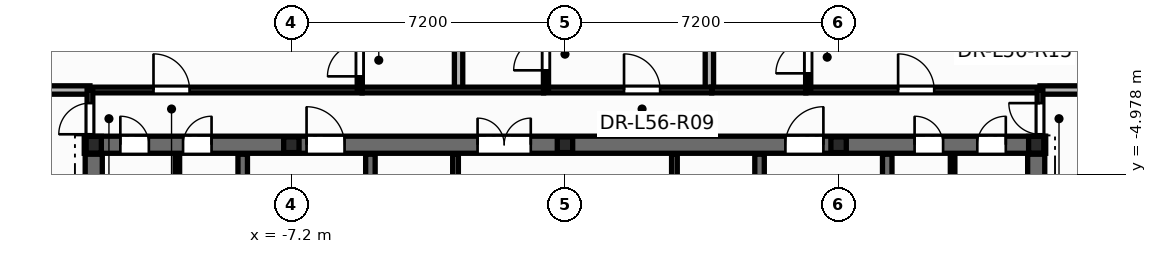
"""IFC4 building model, lengths in metres.
Left out: names, types, materials, properties, quantities, classifications, styles, units other than length and angle.
Written with IfcOpenShell. Run it as: python <this file> out.ifc"""

import sys

from ifc_helpers import new_model, si_unit, direction, frame, frame_2d, origin, origin_2d, place, context, subcontext, project, spatial, rectangle, i_section, extrude, element, fill, save


model = new_model("IFC4")
c1 = context("Model", 3, precision=1e-05, world=origin(), true_north=direction((0.0, 1.0)))
c2 = subcontext(c1, "Body", "Model", "MODEL_VIEW")
j1 = project(units=[si_unit("LENGTHUNIT", "METRE"), si_unit("PLANEANGLEUNIT", "RADIAN")], contexts=[c1])
p1 = place(None, origin())
s1 = spatial("IfcSite", under=j1, at=p1, CompositionType="ELEMENT")
p2 = place(p1, origin())
s2 = spatial("IfcBuilding", under=s1, at=p2, CompositionType="ELEMENT")
p3 = place(p2, frame((0.0, 0.0, 214.5)))
s3 = spatial("IfcBuildingStorey", under=s2, at=p3, CompositionType="ELEMENT", Elevation=214.5)
for number, where, z_axis, x_axis in (
    (1, (12.4, -4.2, 0.0), (0.0, 0.0, 1.0), (1.0, 0.0, 0.0)),
    (2, (-12.4, -4.2, 0.0), (0.0, 0.0, 1.0), (1.0, 0.0, 0.0)),
):
    element("IfcColumn", number, at=place(p3, frame(where, z_axis=z_axis, x_axis=x_axis)), inside=s3, PredefinedType="COLUMN", context=c2, shape_type="SweptSolid", body=[
        extrude(i_section(OverallWidth=0.4, OverallDepth=0.44, WebThickness=0.028, FlangeThickness=0.04, at=origin_2d()), origin(), (0.0, 0.0, 1.0), 3.6),
    ])
for number, where, z_axis, x_axis in (
    (3, (-7.2, -4.2, 0.0), (0.0, 0.0, 1.0), (1.0, 0.0, 0.0)),
    (4, (0.0, -4.2, 0.0), (0.0, 0.0, 1.0), (1.0, 0.0, 0.0)),
    (5, (7.2, -4.2, 0.0), (0.0, 0.0, 1.0), (1.0, 0.0, 0.0)),
):
    element("IfcColumn", number, at=place(p3, frame(where, z_axis=z_axis, x_axis=x_axis)), inside=s3, PredefinedType="PILASTER", context=c2, shape_type="SweptSolid", body=[
        extrude(i_section(OverallWidth=0.405, OverallDepth=0.414, WebThickness=0.022, FlangeThickness=0.032, at=origin_2d()), origin(), (0.0, 0.0, 1.0), 3.6),
    ])
p4 = place(p3, frame((-2.88, -7.1, 0.0), z_axis=(0.0, 0.0, 1.0), x_axis=(0.0, 1.0, 0.0)))
e6 = element("IfcWall", 6, at=p4, inside=s3, PredefinedType="PARTITIONING", context=c2, shape_type="SweptSolid", body=[
    extrude(rectangle(XDim=2.65, YDim=0.15, at=frame_2d((1.325, 0.0))), origin(), (0.0, 0.0, 1.0), 3.345),
])
p5 = place(p4, frame((0.85, 0.0, 0.0)))
e7 = element("IfcOpeningElement", 7, at=p5, cuts=e6, PredefinedType="OPENING", context=c2, shape_type="SweptSolid", body=[
    extrude(rectangle(XDim=0.886, YDim=2.104, at=frame_2d((0.44, 1.052))), frame((0.0, 0.085, 0.0), z_axis=(0.0, -1.0, 0.0), x_axis=(1.0, 0.0, 0.0)), (0.0, 0.0, 1.0), 0.17),
])
p6 = place(p3, frame((2.88, -7.1, 0.0), z_axis=(0.0, 0.0, 1.0), x_axis=(0.0, 1.0, 0.0)))
e8 = element("IfcWall", 8, at=p6, inside=s3, PredefinedType="PARTITIONING", context=c2, shape_type="SweptSolid", body=[
    extrude(rectangle(XDim=2.65, YDim=0.15, at=frame_2d((1.325, 0.0))), origin(), (0.0, 0.0, 1.0), 3.345),
])
p7 = place(p6, frame((0.85, 0.0, 0.0)))
e9 = element("IfcOpeningElement", 9, at=p7, cuts=e8, PredefinedType="OPENING", context=c2, shape_type="SweptSolid", body=[
    extrude(rectangle(XDim=0.886, YDim=2.104, at=frame_2d((0.44, 1.052))), frame((0.0, 0.085, 0.0), z_axis=(0.0, -1.0, 0.0), x_axis=(1.0, 0.0, 0.0)), (0.0, 0.0, 1.0), 0.17),
])
for number, where, z_axis, x_axis in (
    (10, (-10.2, -5.52, 0.0), (0.0, 0.0, 1.0), (0.0, 1.0, 0.0)),
    (11, (10.2, -5.52, 0.0), (0.0, 0.0, 1.0), (0.0, 1.0, 0.0)),
):
    element("IfcWall", number, at=place(p3, frame(where, z_axis=z_axis, x_axis=x_axis)), inside=s3, PredefinedType="PARTITIONING", context=c2, shape_type="SweptSolid", body=[
        extrude(rectangle(XDim=1.12, YDim=0.12, at=frame_2d((0.56, 0.0))), origin(), (0.0, 0.0, 1.0), 3.345),
    ])
p8 = place(p3, frame((-12.65, -4.2, 0.0), z_axis=(0.0, 0.0, 1.0), x_axis=(1.0, 0.0, 0.0)))
e12 = element("IfcWall", 12, at=p8, inside=s3, PredefinedType="SHEAR", context=c2, shape_type="SweptSolid", body=[
    extrude(rectangle(XDim=25.3, YDim=0.45, at=frame_2d((12.65, 0.0))), origin(), (0.0, 0.0, 1.0), 3.6),
])
p9 = place(p8, frame((0.95, 0.0, 0.0)))
e13 = element("IfcOpeningElement", 13, at=p9, cuts=e12, PredefinedType="OPENING", context=c2, shape_type="SweptSolid", body=[
    extrude(rectangle(XDim=0.756, YDim=2.054, at=frame_2d((0.375, 1.027))), frame((0.0, 0.235, 0.0), z_axis=(0.0, -1.0, 0.0), x_axis=(1.0, 0.0, 0.0)), (0.0, 0.0, 1.0), 0.47),
])
p10 = place(p8, frame((2.6, 0.0, 0.0)))
e14 = element("IfcOpeningElement", 14, at=p10, cuts=e12, PredefinedType="OPENING", context=c2, shape_type="SweptSolid", body=[
    extrude(rectangle(XDim=0.756, YDim=2.054, at=frame_2d((0.375, 1.027))), frame((0.0, 0.235, 0.0), z_axis=(0.0, -1.0, 0.0), x_axis=(1.0, 0.0, 0.0)), (0.0, 0.0, 1.0), 0.47),
])
p11 = place(p8, frame((21.85, 0.0, 0.0)))
e15 = element("IfcOpeningElement", 15, at=p11, cuts=e12, PredefinedType="OPENING", context=c2, shape_type="SweptSolid", body=[
    extrude(rectangle(XDim=0.756, YDim=2.054, at=frame_2d((0.375, 1.027))), frame((0.0, 0.235, 0.0), z_axis=(0.0, -1.0, 0.0), x_axis=(1.0, 0.0, 0.0)), (0.0, 0.0, 1.0), 0.47),
])
p12 = place(p8, frame((23.5, 0.0, 0.0)))
e16 = element("IfcOpeningElement", 16, at=p12, cuts=e12, PredefinedType="OPENING", context=c2, shape_type="SweptSolid", body=[
    extrude(rectangle(XDim=0.756, YDim=2.054, at=frame_2d((0.375, 1.027))), frame((0.0, 0.235, 0.0), z_axis=(0.0, -1.0, 0.0), x_axis=(1.0, 0.0, 0.0)), (0.0, 0.0, 1.0), 0.47),
])
p13 = place(p8, frame((5.85, 0.0, 0.0)))
e17 = element("IfcOpeningElement", 17, at=p13, cuts=e12, PredefinedType="OPENING", context=c2, shape_type="SweptSolid", body=[
    extrude(rectangle(XDim=1.006, YDim=2.104, at=frame_2d((0.5, 1.052))), frame((0.0, 0.235, 0.0), z_axis=(0.0, -1.0, 0.0), x_axis=(1.0, 0.0, 0.0)), (0.0, 0.0, 1.0), 0.47),
])
p14 = place(p8, frame((10.35, 0.0, 0.0)))
e18 = element("IfcOpeningElement", 18, at=p14, cuts=e12, PredefinedType="OPENING", context=c2, shape_type="SweptSolid", body=[
    extrude(rectangle(XDim=1.406, YDim=2.154, at=frame_2d((0.7, 1.077))), frame((0.0, 0.235, 0.0), z_axis=(0.0, -1.0, 0.0), x_axis=(1.0, 0.0, 0.0)), (0.0, 0.0, 1.0), 0.47),
])
p15 = place(p8, frame((18.45, 0.0, 0.0)))
e19 = element("IfcOpeningElement", 19, at=p15, cuts=e12, PredefinedType="OPENING", context=c2, shape_type="SweptSolid", body=[
    extrude(rectangle(XDim=1.006, YDim=2.104, at=frame_2d((0.5, 1.052))), frame((0.0, 0.235, 0.0), z_axis=(0.0, -1.0, 0.0), x_axis=(1.0, 0.0, 0.0)), (0.0, 0.0, 1.0), 0.47),
])
p16 = place(p3, frame((-8.48, -13.85, 0.0), z_axis=(0.0, 0.0, 1.0), x_axis=(0.0, 1.0, 0.0)))
e20 = element("IfcWall", 20, at=p16, inside=s3, PredefinedType="SHEAR", context=c2, shape_type="SweptSolid", body=[
    extrude(rectangle(XDim=9.4, YDim=0.25, at=frame_2d((4.7, 0.0))), origin(), (0.0, 0.0, 1.0), 3.6),
])
p17 = place(p16, frame((6.95, 0.0, 0.0)))
e21 = element("IfcOpeningElement", 21, at=p17, cuts=e20, PredefinedType="OPENING", context=c2, shape_type="SweptSolid", body=[
    extrude(rectangle(XDim=1.006, YDim=2.104, at=frame_2d((0.5, 1.052))), frame((0.0, 0.135, 0.0), z_axis=(0.0, -1.0, 0.0), x_axis=(1.0, 0.0, 0.0)), (0.0, 0.0, 1.0), 0.27),
])
p18 = place(p3, frame((8.48, -13.85, 0.0), z_axis=(0.0, 0.0, 1.0), x_axis=(0.0, 1.0, 0.0)))
e22 = element("IfcWall", 22, at=p18, inside=s3, PredefinedType="SHEAR", context=c2, shape_type="SweptSolid", body=[
    extrude(rectangle(XDim=9.4, YDim=0.25, at=frame_2d((4.7, 0.0))), origin(), (0.0, 0.0, 1.0), 3.6),
])
p19 = place(p18, frame((6.95, 0.0, 0.0)))
e23 = element("IfcOpeningElement", 23, at=p19, cuts=e22, PredefinedType="OPENING", context=c2, shape_type="SweptSolid", body=[
    extrude(rectangle(XDim=1.006, YDim=2.104, at=frame_2d((0.5, 1.052))), frame((0.0, 0.135, 0.0), z_axis=(0.0, -1.0, 0.0), x_axis=(1.0, 0.0, 0.0)), (0.0, 0.0, 1.0), 0.27),
])
for number, where, z_axis, x_axis in (
    (24, (-5.12, -13.85, 0.0), (0.0, 0.0, 1.0), (0.0, 1.0, 0.0)),
    (25, (5.12, -13.85, 0.0), (0.0, 0.0, 1.0), (0.0, 1.0, 0.0)),
):
    element("IfcWall", number, at=place(p3, frame(where, z_axis=z_axis, x_axis=x_axis)), inside=s3, PredefinedType="SHEAR", context=c2, shape_type="SweptSolid", body=[
        extrude(rectangle(XDim=9.4, YDim=0.25, at=frame_2d((4.7, 0.0))), origin(), (0.0, 0.0, 1.0), 3.6),
    ])
for number, where, z_axis, x_axis in (
    (26, (-12.4, -13.85, 0.0), (0.0, 0.0, 1.0), (0.0, 1.0, 0.0)),
    (27, (12.4, -13.85, 0.0), (0.0, 0.0, 1.0), (0.0, 1.0, 0.0)),
):
    element("IfcWall", number, at=place(p3, frame(where, z_axis=z_axis, x_axis=x_axis)), inside=s3, PredefinedType="SHEAR", context=c2, shape_type="SweptSolid", body=[
        extrude(rectangle(XDim=9.4, YDim=0.45, at=frame_2d((4.7, 0.0))), origin(), (0.0, 0.0, 1.0), 3.6),
    ])
p20 = place(p3, frame((-12.5, -2.76, 0.0), z_axis=(0.0, 0.0, 1.0), x_axis=(1.0, 0.0, 0.0)))
e28 = element("IfcWall", 28, at=p20, inside=s3, PredefinedType="PARTITIONING", context=c2, shape_type="SweptSolid", body=[
    extrude(rectangle(XDim=7.16, YDim=0.15, at=frame_2d((3.58, 0.0))), origin(), (0.0, 0.0, 1.0), 2.32),
])
p21 = place(p20, frame((1.672, 0.0, 0.0)))
e29 = element("IfcOpeningElement", 29, at=p21, cuts=e28, PredefinedType="OPENING", context=c2, shape_type="SweptSolid", body=[
    extrude(rectangle(XDim=0.956, YDim=2.104, at=frame_2d((0.475, 1.052))), frame((0.0, 0.085, 0.0), z_axis=(0.0, -1.0, 0.0), x_axis=(1.0, 0.0, 0.0)), (0.0, 0.0, 1.0), 0.17),
])
p22 = place(p3, frame((6.34, -2.76, 0.0), z_axis=(0.0, 0.0, 1.0), x_axis=(1.0, 0.0, 0.0)))
e30 = element("IfcWall", 30, at=p22, inside=s3, PredefinedType="PARTITIONING", context=c2, shape_type="SweptSolid", body=[
    extrude(rectangle(XDim=6.16, YDim=0.15, at=frame_2d((3.08, 0.0))), origin(), (0.0, 0.0, 1.0), 2.32),
])
p23 = place(p22, frame((2.426, 0.0, 0.0)))
e31 = element("IfcOpeningElement", 31, at=p23, cuts=e30, PredefinedType="OPENING", context=c2, shape_type="SweptSolid", body=[
    extrude(rectangle(XDim=0.956, YDim=2.104, at=frame_2d((0.475, 1.052))), frame((0.0, 0.085, 0.0), z_axis=(0.0, -1.0, 0.0), x_axis=(1.0, 0.0, 0.0)), (0.0, 0.0, 1.0), 0.17),
])
p24 = place(p3, frame((-2.8, -2.76, 0.0), z_axis=(0.0, 0.0, 1.0), x_axis=(0.0, 1.0, 0.0)))
e32 = element("IfcWall", 32, at=p24, inside=s3, PredefinedType="PARTITIONING", context=c2, shape_type="SweptSolid", body=[
    extrude(rectangle(XDim=16.11, YDim=0.22, at=frame_2d((8.055, 0.0))), origin(), (0.0, 0.0, 1.0), 2.32),
])
p25 = place(p3, frame((3.8, -2.76, 0.0), z_axis=(0.0, 0.0, 1.0), x_axis=(0.0, 1.0, 0.0)))
e33 = element("IfcWall", 33, at=p25, inside=s3, PredefinedType="PARTITIONING", context=c2, shape_type="SweptSolid", body=[
    extrude(rectangle(XDim=15.483, YDim=0.22, at=frame_2d((7.742, 0.0))), origin(), (0.0, 0.0, 1.0), 2.32),
])
p26 = place(p3, frame((-0.56, -2.76, 0.0), z_axis=(0.0, 0.0, 1.0), x_axis=(1.0, 0.0, 0.0)))
e34 = element("IfcWall", 34, at=p26, inside=s3, PredefinedType="PARTITIONING", context=c2, shape_type="SweptSolid", body=[
    extrude(rectangle(XDim=4.42, YDim=0.15, at=frame_2d((2.21, 0.0))), origin(), (0.0, 0.0, 1.0), 2.32),
])
p27 = place(p26, frame((2.114, 0.0, 0.0)))
e35 = element("IfcOpeningElement", 35, at=p27, cuts=e34, PredefinedType="OPENING", context=c2, shape_type="SweptSolid", body=[
    extrude(rectangle(XDim=0.956, YDim=2.104, at=frame_2d((0.475, 1.052))), frame((0.0, 0.085, 0.0), z_axis=(0.0, -1.0, 0.0), x_axis=(1.0, 0.0, 0.0)), (0.0, 0.0, 1.0), 0.17),
])
p28 = place(p3, frame((-5.4, -2.76, 0.0), z_axis=(0.0, 0.0, 1.0), x_axis=(0.0, 1.0, 0.0)))
e36 = element("IfcWall", 36, at=p28, inside=s3, PredefinedType="PARTITIONING", context=c2, shape_type="SweptSolid", body=[
    extrude(rectangle(XDim=2.92, YDim=0.135, at=frame_2d((1.46, 0.0))), origin(), (0.0, 0.0, 1.0), 3.345),
])
p29 = place(p28, frame((0.359, 0.0, 0.0)))
e37 = element("IfcOpeningElement", 37, at=p29, cuts=e36, PredefinedType="OPENING", context=c2, shape_type="SweptSolid", body=[
    extrude(rectangle(XDim=0.856, YDim=2.104, at=frame_2d((0.425, 1.052))), frame((0.0, 0.078, 0.0), z_axis=(0.0, -1.0, 0.0), x_axis=(1.0, 0.0, 0.0)), (0.0, 0.0, 1.0), 0.155),
])
p30 = place(p3, frame((-0.5, -2.76, 0.0), z_axis=(0.0, 0.0, 1.0), x_axis=(0.0, 1.0, 0.0)))
e38 = element("IfcWall", 38, at=p30, inside=s3, PredefinedType="PARTITIONING", context=c2, shape_type="SweptSolid", body=[
    extrude(rectangle(XDim=2.92, YDim=0.135, at=frame_2d((1.46, 0.0))), origin(), (0.0, 0.0, 1.0), 3.345),
])
p31 = place(p30, frame((0.518, 0.0, 0.0)))
e39 = element("IfcOpeningElement", 39, at=p31, cuts=e38, PredefinedType="OPENING", context=c2, shape_type="SweptSolid", body=[
    extrude(rectangle(XDim=0.856, YDim=2.104, at=frame_2d((0.425, 1.052))), frame((0.0, 0.078, 0.0), z_axis=(0.0, -1.0, 0.0), x_axis=(1.0, 0.0, 0.0)), (0.0, 0.0, 1.0), 0.155),
])
p32 = place(p3, frame((6.4, -2.76, 0.0), z_axis=(0.0, 0.0, 1.0), x_axis=(0.0, 1.0, 0.0)))
e40 = element("IfcWall", 40, at=p32, inside=s3, PredefinedType="PARTITIONING", context=c2, shape_type="SweptSolid", body=[
    extrude(rectangle(XDim=2.92, YDim=0.135, at=frame_2d((1.46, 0.0))), origin(), (0.0, 0.0, 1.0), 3.345),
])
p33 = place(p32, frame((0.438, 0.0, 0.0)))
e41 = element("IfcOpeningElement", 41, at=p33, cuts=e40, PredefinedType="OPENING", context=c2, shape_type="SweptSolid", body=[
    extrude(rectangle(XDim=0.856, YDim=2.104, at=frame_2d((0.425, 1.052))), frame((0.0, 0.078, 0.0), z_axis=(0.0, -1.0, 0.0), x_axis=(1.0, 0.0, 0.0)), (0.0, 0.0, 1.0), 0.155),
])
p34 = place(p3, frame((-5.338, -2.76, 0.0), z_axis=(0.0, 0.0, 1.0), x_axis=(1.0, 0.0, 0.0)))
e42 = element("IfcWall", 42, at=p34, inside=s3, PredefinedType="PARTITIONING", context=c2, shape_type="SweptSolid", body=[
    extrude(rectangle(XDim=4.776, YDim=0.15, at=frame_2d((2.388, 0.0))), origin(), (0.0, 0.0, 1.0), 2.964),
])
p35 = place(p3, frame((3.862, -2.76, 0.0), z_axis=(0.0, 0.0, 1.0), x_axis=(1.0, 0.0, 0.0)))
e43 = element("IfcWall", 43, at=p35, inside=s3, PredefinedType="PARTITIONING", context=c2, shape_type="SweptSolid", body=[
    extrude(rectangle(XDim=2.476, YDim=0.15, at=frame_2d((1.238, 0.0))), origin(), (0.0, 0.0, 1.0), 3.345),
])
for number, where, z_axis, x_axis in (
    (44, (-14.926, -2.76, 0.0), (0.0, 0.0, 1.0), (1.0, 0.0, 0.0)),
    (45, (12.5, -2.76, 0.0), (0.0, 0.0, 1.0), (1.0, 0.0, 0.0)),
):
    element("IfcWall", number, at=place(p3, frame(where, z_axis=z_axis, x_axis=x_axis)), inside=s3, PredefinedType="PARTITIONING", context=c2, shape_type="SweptSolid", body=[
        extrude(rectangle(XDim=2.426, YDim=0.22, at=frame_2d((1.213, 0.0))), origin(), (0.0, 0.0, 1.0), 2.32),
    ])
p36 = place(p3, frame((-12.5, -4.24, 0.0), z_axis=(0.0, 0.0, 1.0), x_axis=(0.0, 1.0, 0.0)))
e46 = element("IfcWall", 46, at=p36, inside=s3, PredefinedType="PARTITIONING", context=c2, shape_type="SweptSolid", body=[
    extrude(rectangle(XDim=1.48, YDim=0.15, at=frame_2d((0.74, 0.0))), origin(), (0.0, 0.0, 1.0), 2.32),
])
p37 = place(p36, frame((0.315, 0.0, 0.0)))
e47 = element("IfcOpeningElement", 47, at=p37, cuts=e46, PredefinedType="OPENING", context=c2, shape_type="SweptSolid", body=[
    extrude(rectangle(XDim=0.826, YDim=2.104, at=frame_2d((0.41, 1.052))), frame((0.0, 0.085, 0.0), z_axis=(0.0, -1.0, 0.0), x_axis=(1.0, 0.0, 0.0)), (0.0, 0.0, 1.0), 0.17),
])
p38 = place(p3, frame((12.5, -4.24, 0.0), z_axis=(0.0, 0.0, 1.0), x_axis=(0.0, 1.0, 0.0)))
e48 = element("IfcWall", 48, at=p38, inside=s3, PredefinedType="PARTITIONING", context=c2, shape_type="SweptSolid", body=[
    extrude(rectangle(XDim=1.48, YDim=0.15, at=frame_2d((0.74, 0.0))), origin(), (0.0, 0.0, 1.0), 2.32),
])
p39 = place(p38, frame((0.315, 0.0, 0.0)))
e49 = element("IfcOpeningElement", 49, at=p39, cuts=e48, PredefinedType="OPENING", context=c2, shape_type="SweptSolid", body=[
    extrude(rectangle(XDim=0.826, YDim=2.104, at=frame_2d((0.41, 1.052))), frame((0.0, 0.085, 0.0), z_axis=(0.0, -1.0, 0.0), x_axis=(1.0, 0.0, 0.0)), (0.0, 0.0, 1.0), 0.17),
])
p40 = place(p9, origin())
e50 = element("IfcDoor", 50, at=p40, inside=s3, OperationType="SINGLE_SWING_LEFT", PredefinedType="DOOR", context=c2, shape_type="SweptSolid", body=[
    extrude(rectangle(XDim=0.75, YDim=2.05, at=frame_2d((0.375, 1.025))), frame((0.0, 0.025, 0.0), z_axis=(0.0, -1.0, 0.0), x_axis=(1.0, 0.0, 0.0)), (0.0, 0.0, 1.0), 0.05),
])
fill(e13, e50)
p41 = place(p10, origin())
e51 = element("IfcDoor", 51, at=p41, inside=s3, OperationType="SINGLE_SWING_RIGHT", PredefinedType="DOOR", context=c2, shape_type="SweptSolid", body=[
    extrude(rectangle(XDim=0.75, YDim=2.05, at=frame_2d((0.375, 1.025))), frame((0.0, 0.025, 0.0), z_axis=(0.0, -1.0, 0.0), x_axis=(1.0, 0.0, 0.0)), (0.0, 0.0, 1.0), 0.05),
])
fill(e14, e51)
p42 = place(p11, origin())
e52 = element("IfcDoor", 52, at=p42, inside=s3, OperationType="SINGLE_SWING_LEFT", PredefinedType="DOOR", context=c2, shape_type="SweptSolid", body=[
    extrude(rectangle(XDim=0.75, YDim=2.05, at=frame_2d((0.375, 1.025))), frame((0.0, 0.025, 0.0), z_axis=(0.0, -1.0, 0.0), x_axis=(1.0, 0.0, 0.0)), (0.0, 0.0, 1.0), 0.05),
])
fill(e15, e52)
p43 = place(p12, origin())
e53 = element("IfcDoor", 53, at=p43, inside=s3, OperationType="SINGLE_SWING_RIGHT", PredefinedType="DOOR", context=c2, shape_type="SweptSolid", body=[
    extrude(rectangle(XDim=0.75, YDim=2.05, at=frame_2d((0.375, 1.025))), frame((0.0, 0.025, 0.0), z_axis=(0.0, -1.0, 0.0), x_axis=(1.0, 0.0, 0.0)), (0.0, 0.0, 1.0), 0.05),
])
fill(e16, e53)
p44 = place(p13, origin())
e54 = element("IfcDoor", 54, at=p44, inside=s3, OperationType="SINGLE_SWING_LEFT", PredefinedType="DOOR", context=c2, shape_type="SweptSolid", body=[
    extrude(rectangle(XDim=1.0, YDim=2.1, at=frame_2d((0.5, 1.05))), frame((0.0, 0.025, 0.0), z_axis=(0.0, -1.0, 0.0), x_axis=(1.0, 0.0, 0.0)), (0.0, 0.0, 1.0), 0.05),
])
fill(e17, e54)
p45 = place(p14, origin())
e55 = element("IfcDoor", 55, at=p45, inside=s3, OperationType="DOUBLE_DOOR_SINGLE_SWING", PredefinedType="DOOR", context=c2, shape_type="SweptSolid", body=[
    extrude(rectangle(XDim=1.4, YDim=2.15, at=frame_2d((0.7, 1.075))), frame((0.0, 0.025, 0.0), z_axis=(0.0, -1.0, 0.0), x_axis=(1.0, 0.0, 0.0)), (0.0, 0.0, 1.0), 0.05),
])
fill(e18, e55)
p46 = place(p15, origin())
e56 = element("IfcDoor", 56, at=p46, inside=s3, OperationType="SINGLE_SWING_RIGHT", PredefinedType="DOOR", context=c2, shape_type="SweptSolid", body=[
    extrude(rectangle(XDim=1.0, YDim=2.1, at=frame_2d((0.5, 1.05))), frame((0.0, 0.025, 0.0), z_axis=(0.0, -1.0, 0.0), x_axis=(1.0, 0.0, 0.0)), (0.0, 0.0, 1.0), 0.05),
])
fill(e19, e56)
p47 = place(p37, origin())
e57 = element("IfcDoor", 57, at=p47, inside=s3, OperationType="SINGLE_SWING_LEFT", PredefinedType="DOOR", context=c2, shape_type="SweptSolid", body=[
    extrude(rectangle(XDim=0.82, YDim=2.1, at=frame_2d((0.41, 1.05))), frame((0.0, 0.025, 0.0), z_axis=(0.0, -1.0, 0.0), x_axis=(1.0, 0.0, 0.0)), (0.0, 0.0, 1.0), 0.05),
])
fill(e47, e57)
p48 = place(p39, origin())
e58 = element("IfcDoor", 58, at=p48, inside=s3, OperationType="SINGLE_SWING_RIGHT", PredefinedType="DOOR", context=c2, shape_type="SweptSolid", body=[
    extrude(rectangle(XDim=0.82, YDim=2.1, at=frame_2d((0.41, 1.05))), frame((0.0, 0.025, 0.0), z_axis=(0.0, -1.0, 0.0), x_axis=(1.0, 0.0, 0.0)), (0.0, 0.0, 1.0), 0.05),
])
fill(e49, e58)
p49 = place(p29, origin())
e59 = element("IfcDoor", 59, at=p49, inside=s3, OperationType="SINGLE_SWING_LEFT", PredefinedType="DOOR", context=c2, shape_type="SweptSolid", body=[
    extrude(rectangle(XDim=0.85, YDim=2.1, at=frame_2d((0.425, 1.05))), frame((0.0, 0.025, 0.0), z_axis=(0.0, -1.0, 0.0), x_axis=(1.0, 0.0, 0.0)), (0.0, 0.0, 1.0), 0.05),
])
fill(e37, e59)
p50 = place(p21, origin())
e60 = element("IfcDoor", 60, at=p50, inside=s3, OperationType="SINGLE_SWING_LEFT", PredefinedType="DOOR", context=c2, shape_type="SweptSolid", body=[
    extrude(rectangle(XDim=0.95, YDim=2.1, at=frame_2d((0.475, 1.05))), frame((0.0, 0.025, 0.0), z_axis=(0.0, -1.0, 0.0), x_axis=(1.0, 0.0, 0.0)), (0.0, 0.0, 1.0), 0.05),
])
fill(e29, e60)
p51 = place(p31, origin())
e61 = element("IfcDoor", 61, at=p51, inside=s3, OperationType="SINGLE_SWING_LEFT", PredefinedType="DOOR", context=c2, shape_type="SweptSolid", body=[
    extrude(rectangle(XDim=0.85, YDim=2.1, at=frame_2d((0.425, 1.05))), frame((0.0, 0.025, 0.0), z_axis=(0.0, -1.0, 0.0), x_axis=(1.0, 0.0, 0.0)), (0.0, 0.0, 1.0), 0.05),
])
fill(e39, e61)
p52 = place(p27, origin())
e62 = element("IfcDoor", 62, at=p52, inside=s3, OperationType="SINGLE_SWING_LEFT", PredefinedType="DOOR", context=c2, shape_type="SweptSolid", body=[
    extrude(rectangle(XDim=0.95, YDim=2.1, at=frame_2d((0.475, 1.05))), frame((0.0, 0.025, 0.0), z_axis=(0.0, -1.0, 0.0), x_axis=(1.0, 0.0, 0.0)), (0.0, 0.0, 1.0), 0.05),
])
fill(e35, e62)
p53 = place(p33, origin())
e63 = element("IfcDoor", 63, at=p53, inside=s3, OperationType="SINGLE_SWING_LEFT", PredefinedType="DOOR", context=c2, shape_type="SweptSolid", body=[
    extrude(rectangle(XDim=0.85, YDim=2.1, at=frame_2d((0.425, 1.05))), frame((0.0, 0.025, 0.0), z_axis=(0.0, -1.0, 0.0), x_axis=(1.0, 0.0, 0.0)), (0.0, 0.0, 1.0), 0.05),
])
fill(e41, e63)
p54 = place(p23, origin())
e64 = element("IfcDoor", 64, at=p54, inside=s3, OperationType="SINGLE_SWING_LEFT", PredefinedType="DOOR", context=c2, shape_type="SweptSolid", body=[
    extrude(rectangle(XDim=0.95, YDim=2.1, at=frame_2d((0.475, 1.05))), frame((0.0, 0.025, 0.0), z_axis=(0.0, -1.0, 0.0), x_axis=(1.0, 0.0, 0.0)), (0.0, 0.0, 1.0), 0.05),
])
fill(e31, e64)
save(model, sys.argv[1])
